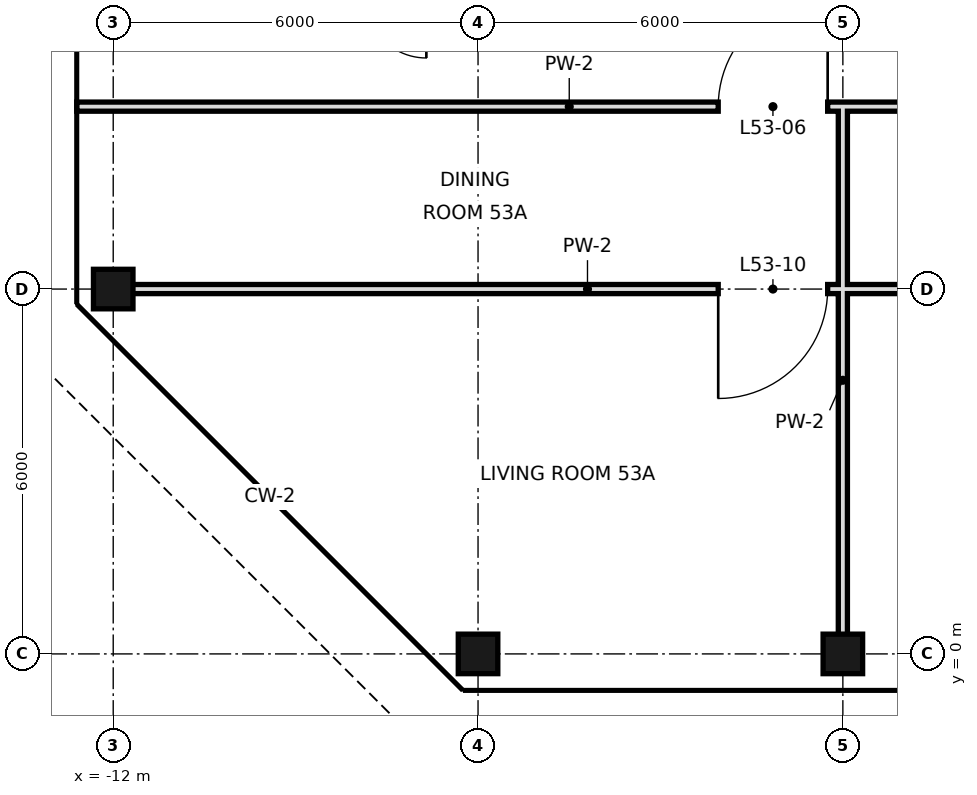
"""IFC4 building model, lengths in metres.
Left out: names, types, materials, properties, quantities, classifications, styles, units other than length and angle.
Written with IfcOpenShell. Run it as: python <this file> out.ifc"""

import sys

from ifc_helpers import new_model, si_unit, direction, frame, frame_2d, origin, origin_2d, place, context, subcontext, project, spatial, rectangle, hollow_rectangle, extrude, element, fill, save


model = new_model("IFC4")
c1 = context("Model", 3, precision=1e-05, world=origin(), true_north=direction((0.0, 1.0)))
c2 = subcontext(c1, "Body", "Model", "MODEL_VIEW")
j1 = project(units=[si_unit("LENGTHUNIT", "METRE"), si_unit("PLANEANGLEUNIT", "RADIAN")], contexts=[c1])
p1 = place(None, origin())
s1 = spatial("IfcSite", under=j1, at=p1, CompositionType="ELEMENT")
p2 = place(p1, origin())
s2 = spatial("IfcBuilding", under=s1, at=p2, CompositionType="ELEMENT")
p3 = place(p2, frame((0.0, 0.0, 226.2)))
s3 = spatial("IfcBuildingStorey", under=s2, at=p3, CompositionType="ELEMENT", Elevation=226.2)
for number, where, z_axis, x_axis in (
    (1, (-12.0, 6.0, 0.0), (0.0, 0.0, 1.0), (1.0, 0.0, 0.0)),
    (2, (-6.0, 0.0, 0.0), (0.0, 0.0, 1.0), (1.0, 0.0, 0.0)),
    (3, (0.0, 0.0, 0.0), (0.0, 0.0, 1.0), (1.0, 0.0, 0.0)),
):
    element("IfcColumn", number, at=place(p3, frame(where, z_axis=z_axis, x_axis=x_axis)), inside=s3, PredefinedType="COLUMN", context=c2, shape_type="SweptSolid", body=[
        extrude(hollow_rectangle(XDim=0.65, YDim=0.65, WallThickness=0.032, at=origin_2d()), origin(), (0.0, 0.0, 1.0), 3.6),
    ])
p4 = place(p3, frame((0.0, 0.0, 0.0), z_axis=(0.0, 0.0, 1.0), x_axis=(0.0, 1.0, 0.0)))
e4 = element("IfcWall", 4, at=p4, inside=s3, PredefinedType="PARTITIONING", context=c2, shape_type="SweptSolid", body=[
    extrude(rectangle(XDim=9.0, YDim=0.15, at=frame_2d((4.5, 0.0))), origin(), (0.0, 0.0, 1.0), 2.72),
])
p5 = place(p3, frame((-12.0, 6.0, 0.0), z_axis=(0.0, 0.0, 1.0), x_axis=(1.0, 0.0, 0.0)))
e5 = element("IfcWall", 5, at=p5, inside=s3, PredefinedType="PARTITIONING", context=c2, shape_type="SweptSolid", body=[
    extrude(rectangle(XDim=15.6, YDim=0.15, at=frame_2d((7.8, 0.0))), origin(), (0.0, 0.0, 1.0), 2.72),
])
p6 = place(p5, frame((9.95, 0.0, 0.0)))
e6 = element("IfcOpeningElement", 6, at=p6, cuts=e5, PredefinedType="OPENING", context=c2, shape_type="SweptSolid", body=[
    extrude(rectangle(XDim=1.8, YDim=2.4, at=frame_2d((0.9, 1.2))), frame((0.0, 0.085, 0.0), z_axis=(0.0, -1.0, 0.0), x_axis=(1.0, 0.0, 0.0)), (0.0, 0.0, 1.0), 0.17),
])
p7 = place(p5, frame((13.3, 0.0, 0.0)))
e7 = element("IfcOpeningElement", 7, at=p7, cuts=e5, PredefinedType="OPENING", context=c2, shape_type="SweptSolid", body=[
    extrude(rectangle(XDim=1.0, YDim=2.4, at=frame_2d((0.5, 1.2))), frame((0.0, 0.085, 0.0), z_axis=(0.0, -1.0, 0.0), x_axis=(1.0, 0.0, 0.0)), (0.0, 0.0, 1.0), 0.17),
])
p8 = place(p3, frame((-12.6, 9.0, 0.0), z_axis=(0.0, 0.0, 1.0), x_axis=(1.0, 0.0, 0.0)))
e8 = element("IfcWall", 8, at=p8, inside=s3, PredefinedType="PARTITIONING", context=c2, shape_type="SweptSolid", body=[
    extrude(rectangle(XDim=16.2, YDim=0.15, at=frame_2d((8.1, 0.0))), origin(), (0.0, 0.0, 1.0), 3.42),
])
p9 = place(p8, frame((10.55, 0.0, 0.0)))
e9 = element("IfcOpeningElement", 9, at=p9, cuts=e8, PredefinedType="OPENING", context=c2, shape_type="SweptSolid", body=[
    extrude(rectangle(XDim=1.8, YDim=2.4, at=frame_2d((0.9, 1.2))), frame((0.0, 0.085, 0.0), z_axis=(0.0, -1.0, 0.0), x_axis=(1.0, 0.0, 0.0)), (0.0, 0.0, 1.0), 0.17),
])
p10 = place(p8, frame((13.9, 0.0, 0.0)))
e10 = element("IfcOpeningElement", 10, at=p10, cuts=e8, PredefinedType="OPENING", context=c2, shape_type="SweptSolid", body=[
    extrude(rectangle(XDim=1.0, YDim=2.4, at=frame_2d((0.5, 1.2))), frame((0.0, 0.085, 0.0), z_axis=(0.0, -1.0, 0.0), x_axis=(1.0, 0.0, 0.0)), (0.0, 0.0, 1.0), 0.17),
])
p11 = place(p9, frame((1.8, 0.0, 0.0), z_axis=(0.0, 0.0, 1.0), x_axis=(-1.0, 0.0, 0.0)))
e11 = element("IfcDoor", 11, at=p11, inside=s3, OperationType="SINGLE_SWING_LEFT", PredefinedType="DOOR", context=c2, shape_type="SweptSolid", body=[
    extrude(rectangle(XDim=1.8, YDim=2.4, at=frame_2d((0.9, 1.2))), frame((0.0, 0.025, 0.0), z_axis=(0.0, -1.0, 0.0), x_axis=(1.0, 0.0, 0.0)), (0.0, 0.0, 1.0), 0.05),
])
fill(e9, e11)
p12 = place(p6, frame((1.8, 0.0, 0.0), z_axis=(0.0, 0.0, 1.0), x_axis=(-1.0, 0.0, 0.0)))
e12 = element("IfcDoor", 12, at=p12, inside=s3, OperationType="SINGLE_SWING_RIGHT", PredefinedType="DOOR", context=c2, shape_type="SweptSolid", body=[
    extrude(rectangle(XDim=1.8, YDim=2.4, at=frame_2d((0.9, 1.2))), frame((0.0, 0.025, 0.0), z_axis=(0.0, -1.0, 0.0), x_axis=(1.0, 0.0, 0.0)), (0.0, 0.0, 1.0), 0.05),
])
fill(e6, e12)
save(model, sys.argv[1])
